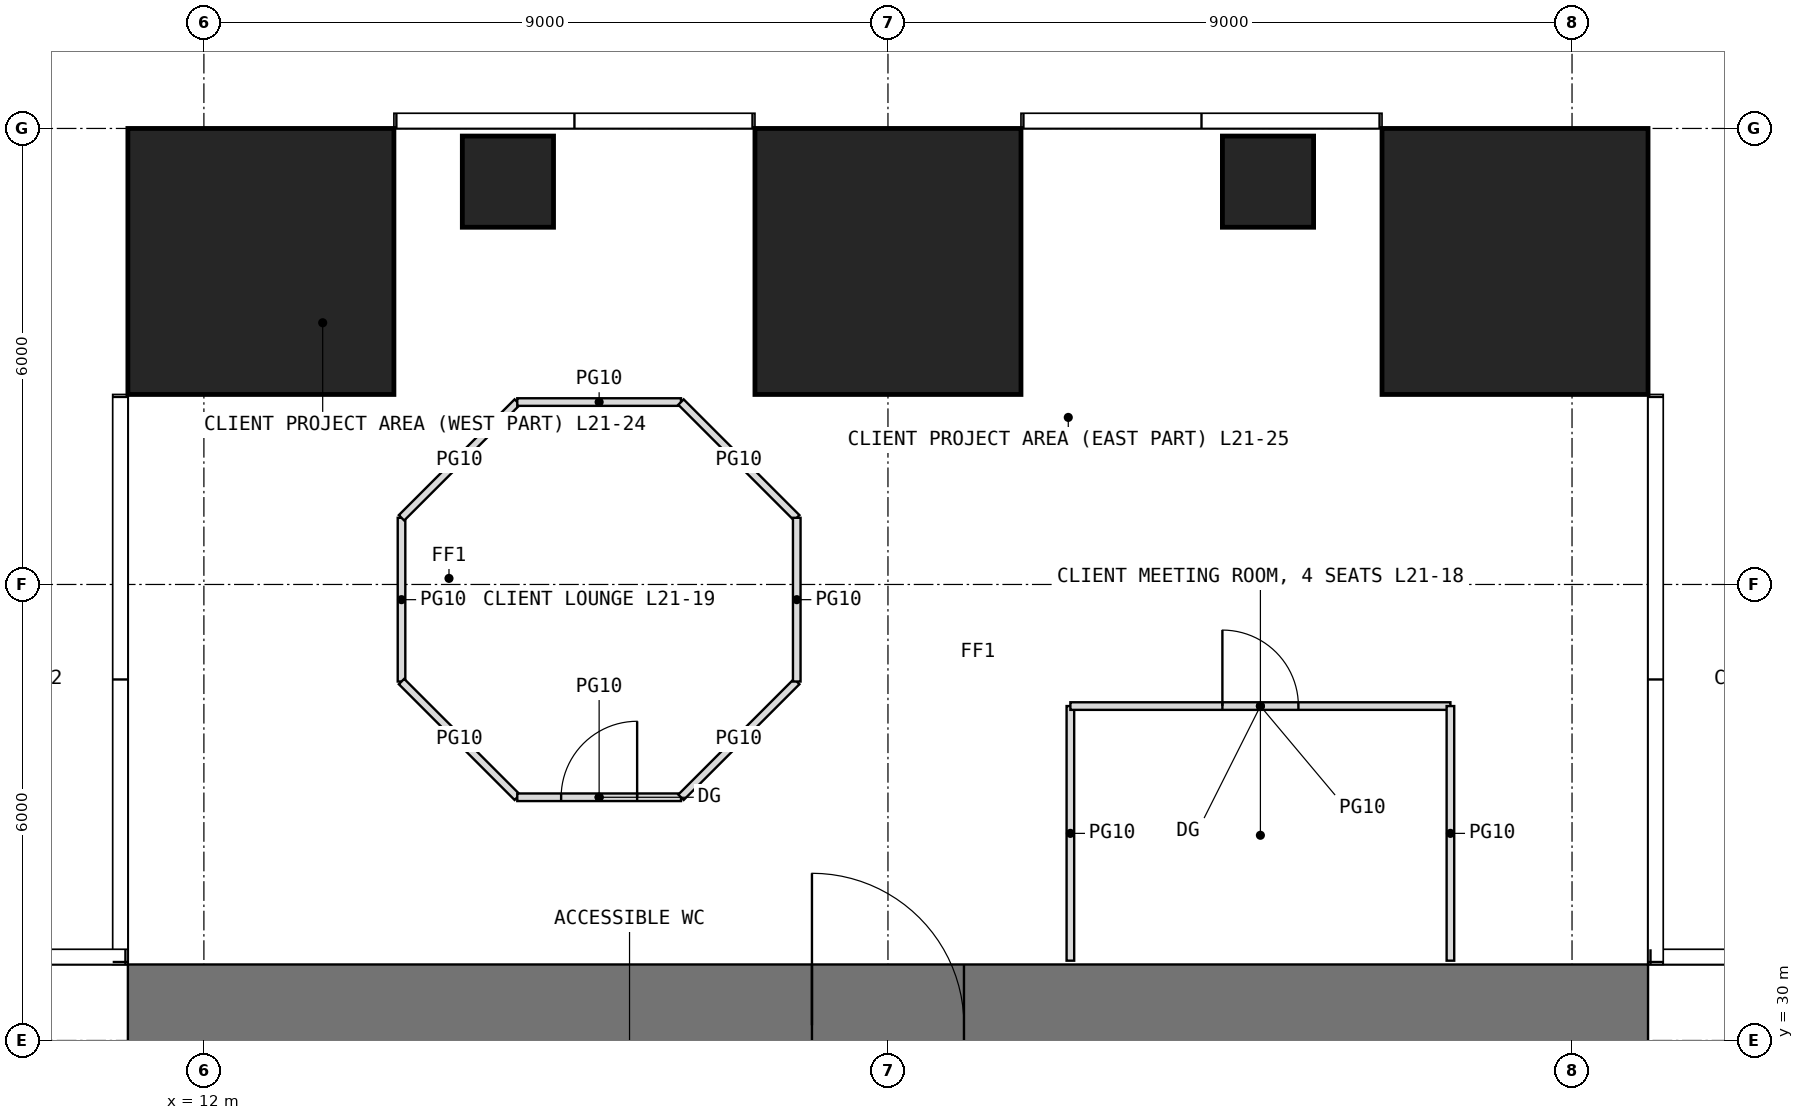
"""IFC4 building model, lengths in metres.
Left out: names, types, materials, properties, quantities, classifications, styles, units other than length and angle.
Written with IfcOpenShell. Run it as: python <this file> out.ifc"""

import sys

from ifc_helpers import new_model, si_unit, direction, frame, frame_2d, origin, origin_2d, place, context, subcontext, project, spatial, rectangle, extrude, element, fill, save


model = new_model("IFC4")
c1 = context("Model", 3, precision=1e-05, world=origin(), true_north=direction((0.0, 1.0)))
c2 = subcontext(c1, "Body", "Model", "MODEL_VIEW")
j1 = project(units=[si_unit("LENGTHUNIT", "METRE"), si_unit("PLANEANGLEUNIT", "RADIAN")], contexts=[c1])
p1 = place(None, origin())
s1 = spatial("IfcSite", under=j1, at=p1, CompositionType="ELEMENT")
p2 = place(p1, origin())
s2 = spatial("IfcBuilding", under=s1, at=p2, CompositionType="ELEMENT")
p3 = place(p2, frame((0.0, 0.0, 91.5)))
s3 = spatial("IfcBuildingStorey", under=s2, at=p3, CompositionType="ELEMENT", Elevation=91.5)
p4 = place(p3, frame((12.75, 40.25, 0.0), z_axis=(0.0, 0.0, 1.0), x_axis=(1.0, 0.0, 0.0)))
e1 = element("IfcColumn", 1, at=p4, inside=s3, PredefinedType="COLUMN", context=c2, shape_type="SweptSolid", body=[
    extrude(rectangle(XDim=3.5, YDim=3.5, at=origin_2d()), origin(), (0.0, 0.0, 1.0), 5.0),
])
p5 = place(p3, frame((16.0, 41.3, 0.0), z_axis=(0.0, 0.0, 1.0), x_axis=(1.0, 0.0, 0.0)))
e2 = element("IfcColumn", 2, at=p5, inside=s3, PredefinedType="COLUMN", context=c2, shape_type="SweptSolid", body=[
    extrude(rectangle(XDim=1.2, YDim=1.2, at=origin_2d()), origin(), (0.0, 0.0, 1.0), 5.0),
])
p6 = place(p3, frame((21.0, 40.25, 0.0), z_axis=(0.0, 0.0, 1.0), x_axis=(1.0, 0.0, 0.0)))
e3 = element("IfcColumn", 3, at=p6, inside=s3, PredefinedType="COLUMN", context=c2, shape_type="SweptSolid", body=[
    extrude(rectangle(XDim=3.5, YDim=3.5, at=origin_2d()), origin(), (0.0, 0.0, 1.0), 5.0),
])
p7 = place(p3, frame((26.0, 41.3, 0.0), z_axis=(0.0, 0.0, 1.0), x_axis=(1.0, 0.0, 0.0)))
e4 = element("IfcColumn", 4, at=p7, inside=s3, PredefinedType="COLUMN", context=c2, shape_type="SweptSolid", body=[
    extrude(rectangle(XDim=1.2, YDim=1.2, at=origin_2d()), origin(), (0.0, 0.0, 1.0), 5.0),
])
p8 = place(p3, frame((29.25, 40.25, 0.0), z_axis=(0.0, 0.0, 1.0), x_axis=(1.0, 0.0, 0.0)))
e5 = element("IfcColumn", 5, at=p8, inside=s3, PredefinedType="COLUMN", context=c2, shape_type="SweptSolid", body=[
    extrude(rectangle(XDim=3.5, YDim=3.5, at=origin_2d()), origin(), (0.0, 0.0, 1.0), 5.0),
])
p9 = place(p3, frame((11.0, 30.2, -0.05), z_axis=(0.0, 0.0, 1.0), x_axis=(1.0, 0.0, 0.0)))
e6 = element("IfcWall", 6, at=p9, inside=s3, PredefinedType="SHEAR", context=c2, shape_type="SweptSolid", body=[
    extrude(rectangle(XDim=20.0, YDim=1.6, at=frame_2d((10.0, 0.0))), origin(), (0.0, 0.0, 1.0), 5.0),
])
p10 = place(p9, frame((9.0, 0.0, 0.05)))
e7 = element("IfcOpeningElement", 7, at=p10, cuts=e6, PredefinedType="OPENING", context=c2, shape_type="SweptSolid", body=[
    extrude(rectangle(XDim=2.0, YDim=2.2, at=frame_2d((1.0, 1.1))), frame((0.0, 0.81, 0.0), z_axis=(0.0, -1.0, 0.0), x_axis=(1.0, 0.0, 0.0)), (0.0, 0.0, 1.0), 1.62),
])
p11 = place(p3, frame((14.6, 34.723, 0.0), z_axis=(0.0, 0.0, 1.0), x_axis=(0.0, 1.0, 0.0)))
e8 = element("IfcWall", 8, at=p11, inside=s3, PredefinedType="PARTITIONING", context=c2, shape_type="SweptSolid", body=[
    extrude(rectangle(XDim=2.154, YDim=0.1, at=frame_2d((1.077, 0.0))), origin(), (0.0, 0.0, 1.0), 4.75),
])
for number, where, z_axis, x_axis in (
    (9, (14.6, 34.723, 0.0), (0.0, 0.0, 1.0), (0.707, -0.707, 0.0)),
    (10, (14.6, 36.877, 0.0), (0.0, 0.0, 1.0), (0.707, 0.707, 0.0)),
):
    element("IfcWall", number, at=place(p3, frame(where, z_axis=z_axis, x_axis=x_axis)), inside=s3, PredefinedType="PARTITIONING", context=c2, shape_type="SweptSolid", body=[
        extrude(rectangle(XDim=2.154, YDim=0.1, at=frame_2d((1.077, 0.0))), origin(), (0.0, 0.0, 1.0), 4.75),
    ])
p12 = place(p3, frame((16.123, 33.2, 0.0), z_axis=(0.0, 0.0, 1.0), x_axis=(1.0, 0.0, 0.0)))
e11 = element("IfcWall", 11, at=p12, inside=s3, PredefinedType="PARTITIONING", context=c2, shape_type="SweptSolid", body=[
    extrude(rectangle(XDim=2.154, YDim=0.1, at=frame_2d((1.077, 0.0))), origin(), (0.0, 0.0, 1.0), 4.75),
])
p13 = place(p12, frame((0.577, 0.0, 0.0)))
e12 = element("IfcOpeningElement", 12, at=p13, cuts=e11, PredefinedType="OPENING", context=c2, shape_type="SweptSolid", body=[
    extrude(rectangle(XDim=1.0, YDim=2.4, at=frame_2d((0.5, 1.2))), frame((0.0, 0.06, 0.0), z_axis=(0.0, -1.0, 0.0), x_axis=(1.0, 0.0, 0.0)), (0.0, 0.0, 1.0), 0.12),
])
p14 = place(p3, frame((16.123, 38.4, 0.0), z_axis=(0.0, 0.0, 1.0), x_axis=(1.0, 0.0, 0.0)))
e13 = element("IfcWall", 13, at=p14, inside=s3, PredefinedType="PARTITIONING", context=c2, shape_type="SweptSolid", body=[
    extrude(rectangle(XDim=2.154, YDim=0.1, at=frame_2d((1.077, 0.0))), origin(), (0.0, 0.0, 1.0), 4.75),
])
for number, where, z_axis, x_axis in (
    (14, (18.277, 33.2, 0.0), (0.0, 0.0, 1.0), (0.707, 0.707, 0.0)),
    (15, (18.277, 38.4, 0.0), (0.0, 0.0, 1.0), (0.707, -0.707, 0.0)),
):
    element("IfcWall", number, at=place(p3, frame(where, z_axis=z_axis, x_axis=x_axis)), inside=s3, PredefinedType="PARTITIONING", context=c2, shape_type="SweptSolid", body=[
        extrude(rectangle(XDim=2.154, YDim=0.1, at=frame_2d((1.077, 0.0))), origin(), (0.0, 0.0, 1.0), 4.75),
    ])
p15 = place(p3, frame((19.8, 34.723, 0.0), z_axis=(0.0, 0.0, 1.0), x_axis=(0.0, 1.0, 0.0)))
e16 = element("IfcWall", 16, at=p15, inside=s3, PredefinedType="PARTITIONING", context=c2, shape_type="SweptSolid", body=[
    extrude(rectangle(XDim=2.154, YDim=0.1, at=frame_2d((1.077, 0.0))), origin(), (0.0, 0.0, 1.0), 4.75),
])
p16 = place(p3, frame((23.4, 31.05, 0.0), z_axis=(0.0, 0.0, 1.0), x_axis=(0.0, 1.0, 0.0)))
e17 = element("IfcWall", 17, at=p16, inside=s3, PredefinedType="PARTITIONING", context=c2, shape_type="SweptSolid", body=[
    extrude(rectangle(XDim=3.35, YDim=0.1, at=frame_2d((1.675, 0.0))), origin(), (0.0, 0.0, 1.0), 4.75),
])
p17 = place(p3, frame((23.4, 34.4, 0.0), z_axis=(0.0, 0.0, 1.0), x_axis=(1.0, 0.0, 0.0)))
e18 = element("IfcWall", 18, at=p17, inside=s3, PredefinedType="PARTITIONING", context=c2, shape_type="SweptSolid", body=[
    extrude(rectangle(XDim=5.0, YDim=0.1, at=frame_2d((2.5, 0.0))), origin(), (0.0, 0.0, 1.0), 4.75),
])
p18 = place(p17, frame((2.0, 0.0, 0.0)))
e19 = element("IfcOpeningElement", 19, at=p18, cuts=e18, PredefinedType="OPENING", context=c2, shape_type="SweptSolid", body=[
    extrude(rectangle(XDim=1.0, YDim=2.4, at=frame_2d((0.5, 1.2))), frame((0.0, 0.06, 0.0), z_axis=(0.0, -1.0, 0.0), x_axis=(1.0, 0.0, 0.0)), (0.0, 0.0, 1.0), 0.12),
])
p19 = place(p3, frame((28.4, 31.05, 0.0), z_axis=(0.0, 0.0, 1.0), x_axis=(0.0, 1.0, 0.0)))
e20 = element("IfcWall", 20, at=p19, inside=s3, PredefinedType="PARTITIONING", context=c2, shape_type="SweptSolid", body=[
    extrude(rectangle(XDim=3.35, YDim=0.1, at=frame_2d((1.675, 0.0))), origin(), (0.0, 0.0, 1.0), 4.75),
])
p20 = place(p10, origin())
e21 = element("IfcDoor", 21, at=p20, inside=s3, OperationType="DOUBLE_DOOR_SINGLE_SWING", PredefinedType="DOOR", context=c2, shape_type="SweptSolid", body=[
    extrude(rectangle(XDim=2.0, YDim=2.2, at=frame_2d((1.0, 1.1))), frame((0.0, 0.025, 0.0), z_axis=(0.0, -1.0, 0.0), x_axis=(1.0, 0.0, 0.0)), (0.0, 0.0, 1.0), 0.05),
])
fill(e7, e21)
p21 = place(p18, origin())
e22 = element("IfcDoor", 22, at=p21, inside=s3, OperationType="SINGLE_SWING_LEFT", PredefinedType="DOOR", context=c2, shape_type="SweptSolid", body=[
    extrude(rectangle(XDim=1.0, YDim=2.4, at=frame_2d((0.5, 1.2))), frame((0.0, 0.025, 0.0), z_axis=(0.0, -1.0, 0.0), x_axis=(1.0, 0.0, 0.0)), (0.0, 0.0, 1.0), 0.05),
])
fill(e19, e22)
p22 = place(p13, origin())
e23 = element("IfcDoor", 23, at=p22, inside=s3, OperationType="SINGLE_SWING_RIGHT", PredefinedType="DOOR", context=c2, shape_type="SweptSolid", body=[
    extrude(rectangle(XDim=1.0, YDim=2.4, at=frame_2d((0.5, 1.2))), frame((0.0, 0.025, 0.0), z_axis=(0.0, -1.0, 0.0), x_axis=(1.0, 0.0, 0.0)), (0.0, 0.0, 1.0), 0.05),
])
fill(e12, e23)
save(model, sys.argv[1])
